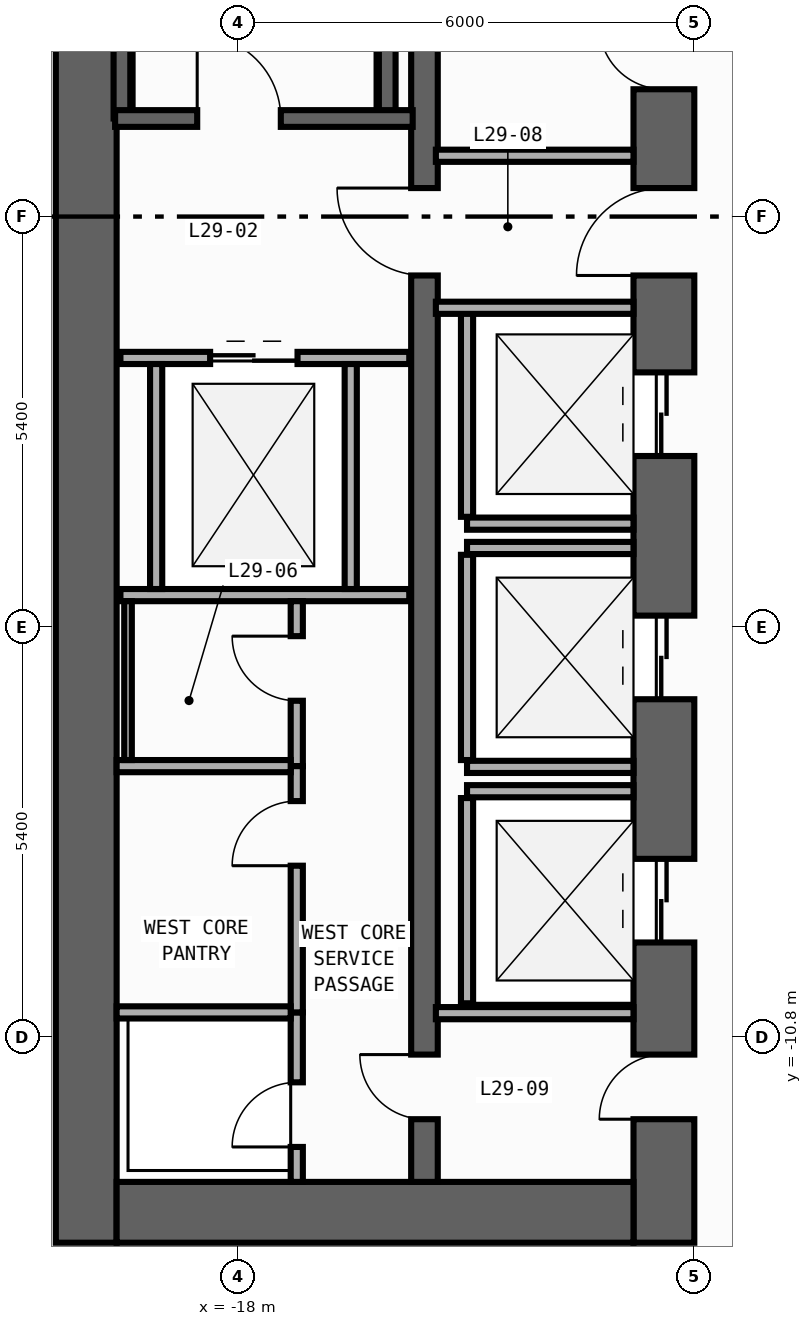
"""IFC4 building model, lengths in metres.
Left out: names, types, materials, properties, quantities, classifications, styles, units other than length and angle.
Written with IfcOpenShell. Run it as: python <this file> out.ifc"""

import sys

from ifc_helpers import new_model, si_unit, direction, frame, frame_2d, origin, place, context, subcontext, project, spatial, rectangle, extrude, element, fill, save


model = new_model("IFC4")
c1 = context("Model", 3, precision=1e-05, world=origin(), true_north=direction((0.0, 1.0)))
c2 = subcontext(c1, "Body", "Model", "MODEL_VIEW")
j1 = project(units=[si_unit("LENGTHUNIT", "METRE"), si_unit("PLANEANGLEUNIT", "RADIAN")], contexts=[c1])
p1 = place(None, origin())
s1 = spatial("IfcSite", under=j1, at=p1, CompositionType="ELEMENT")
p2 = place(p1, origin())
s2 = spatial("IfcBuilding", under=s1, at=p2, CompositionType="ELEMENT")
p3 = place(p2, frame((0.0, 0.0, 126.8)))
s3 = spatial("IfcBuildingStorey", under=s2, at=p3, CompositionType="ELEMENT", Elevation=126.8)
p4 = place(p3, frame((-20.0, -13.5, 0.0), z_axis=(0.0, 0.0, 1.0), x_axis=(0.0, 1.0, 0.0)))
e1 = element("IfcWall", 1, at=p4, inside=s3, PredefinedType="SHEAR", context=c2, shape_type="SweptSolid", body=[
    extrude(rectangle(XDim=27.0, YDim=0.8, at=frame_2d((13.5, 0.0))), origin(), (0.0, 0.0, 1.0), 3.94),
])
p5 = place(p3, frame((-12.4, -13.5, 0.0), z_axis=(0.0, 0.0, 1.0), x_axis=(0.0, 1.0, 0.0)))
e2 = element("IfcWall", 2, at=p5, inside=s3, PredefinedType="SHEAR", context=c2, shape_type="SweptSolid", body=[
    extrude(rectangle(XDim=27.0, YDim=0.8, at=frame_2d((13.5, 0.0))), origin(), (0.0, 0.0, 1.0), 3.94),
])
p6 = place(p5, frame((10.35, 0.0, 0.0)))
e3 = element("IfcOpeningElement", 3, at=p6, cuts=e2, PredefinedType="OPENING", context=c2, shape_type="SweptSolid", body=[
    extrude(rectangle(XDim=1.1, YDim=2.2, at=frame_2d((0.55, 1.1))), frame((0.0, 0.41, 0.0), z_axis=(0.0, -1.0, 0.0), x_axis=(1.0, 0.0, 0.0)), (0.0, 0.0, 1.0), 0.82),
])
p7 = place(p5, frame((7.15, 0.0, 0.0)))
e4 = element("IfcOpeningElement", 4, at=p7, cuts=e2, PredefinedType="OPENING", context=c2, shape_type="SweptSolid", body=[
    extrude(rectangle(XDim=1.1, YDim=2.2, at=frame_2d((0.55, 1.1))), frame((0.0, 0.41, 0.0), z_axis=(0.0, -1.0, 0.0), x_axis=(1.0, 0.0, 0.0)), (0.0, 0.0, 1.0), 0.82),
])
p8 = place(p5, frame((3.95, 0.0, 0.0)))
e5 = element("IfcOpeningElement", 5, at=p8, cuts=e2, PredefinedType="OPENING", context=c2, shape_type="SweptSolid", body=[
    extrude(rectangle(XDim=1.1, YDim=2.2, at=frame_2d((0.55, 1.1))), frame((0.0, 0.41, 0.0), z_axis=(0.0, -1.0, 0.0), x_axis=(1.0, 0.0, 0.0)), (0.0, 0.0, 1.0), 0.82),
])
p9 = place(p5, frame((15.175, 0.0, 0.0)))
e6 = element("IfcOpeningElement", 6, at=p9, cuts=e2, PredefinedType="OPENING", context=c2, shape_type="SweptSolid", body=[
    extrude(rectangle(XDim=0.85, YDim=2.1, at=frame_2d((0.425, 1.05))), frame((0.0, 0.41, 0.0), z_axis=(0.0, -1.0, 0.0), x_axis=(1.0, 0.0, 0.0)), (0.0, 0.0, 1.0), 0.82),
])
p10 = place(p5, frame((21.275, 0.0, 0.0)))
e7 = element("IfcOpeningElement", 7, at=p10, cuts=e2, PredefinedType="OPENING", context=c2, shape_type="SweptSolid", body=[
    extrude(rectangle(XDim=0.85, YDim=2.1, at=frame_2d((0.425, 1.05))), frame((0.0, 0.41, 0.0), z_axis=(0.0, -1.0, 0.0), x_axis=(1.0, 0.0, 0.0)), (0.0, 0.0, 1.0), 0.82),
])
p11 = place(p5, frame((12.725, 0.0, 0.0)))
e8 = element("IfcOpeningElement", 8, at=p11, cuts=e2, PredefinedType="OPENING", context=c2, shape_type="SweptSolid", body=[
    extrude(rectangle(XDim=1.15, YDim=2.2, at=frame_2d((0.575, 1.1))), frame((0.0, 0.41, 0.0), z_axis=(0.0, -1.0, 0.0), x_axis=(1.0, 0.0, 0.0)), (0.0, 0.0, 1.0), 0.82),
])
p12 = place(p5, frame((1.625, 0.0, 0.0)))
e9 = element("IfcOpeningElement", 9, at=p12, cuts=e2, PredefinedType="OPENING", context=c2, shape_type="SweptSolid", body=[
    extrude(rectangle(XDim=0.85, YDim=2.1, at=frame_2d((0.425, 1.05))), frame((0.0, 0.41, 0.0), z_axis=(0.0, -1.0, 0.0), x_axis=(1.0, 0.0, 0.0)), (0.0, 0.0, 1.0), 0.82),
])
p13 = place(p3, frame((-19.6, -13.1, 0.0), z_axis=(0.0, 0.0, 1.0), x_axis=(1.0, 0.0, 0.0)))
e10 = element("IfcWall", 10, at=p13, inside=s3, PredefinedType="SHEAR", context=c2, shape_type="SweptSolid", body=[
    extrude(rectangle(XDim=6.8, YDim=0.8, at=frame_2d((3.4, 0.0))), origin(), (0.0, 0.0, 1.0), 3.94),
])
p14 = place(p3, frame((-15.55, -12.7, 0.0), z_axis=(0.0, 0.0, 1.0), x_axis=(0.0, 1.0, 0.0)))
e11 = element("IfcWall", 11, at=p14, inside=s3, PredefinedType="SHEAR", context=c2, shape_type="SweptSolid", body=[
    extrude(rectangle(XDim=25.4, YDim=0.35, at=frame_2d((12.7, 0.0))), origin(), (0.0, 0.0, 1.0), 3.94),
])
p15 = place(p14, frame((11.925, 0.0, 0.0)))
e12 = element("IfcOpeningElement", 12, at=p15, cuts=e11, PredefinedType="OPENING", context=c2, shape_type="SweptSolid", body=[
    extrude(rectangle(XDim=1.15, YDim=2.2, at=frame_2d((0.575, 1.1))), frame((0.0, 0.185, 0.0), z_axis=(0.0, -1.0, 0.0), x_axis=(1.0, 0.0, 0.0)), (0.0, 0.0, 1.0), 0.37),
])
p16 = place(p14, frame((0.825, 0.0, 0.0)))
e13 = element("IfcOpeningElement", 13, at=p16, cuts=e11, PredefinedType="OPENING", context=c2, shape_type="SweptSolid", body=[
    extrude(rectangle(XDim=0.85, YDim=2.1, at=frame_2d((0.425, 1.05))), frame((0.0, 0.185, 0.0), z_axis=(0.0, -1.0, 0.0), x_axis=(1.0, 0.0, 0.0)), (0.0, 0.0, 1.0), 0.37),
])
for number, where, z_axis, x_axis in (
    (14, (-16.04, 1.29, 0.0), (0.0, 0.0, 1.0), (0.0, 1.0, 0.0)),
    (15, (-19.53, 1.29, 0.0), (0.0, 0.0, 1.0), (0.0, 1.0, 0.0)),
):
    element("IfcWall", number, at=place(p3, frame(where, z_axis=z_axis, x_axis=x_axis)), inside=s3, PredefinedType="SHEAR", context=c2, shape_type="SweptSolid", body=[
        extrude(rectangle(XDim=11.3, YDim=0.22, at=frame_2d((5.65, 0.0))), origin(), (0.0, 0.0, 1.0), 3.94),
    ])
p17 = place(p3, frame((-19.62, 1.29, 0.0), z_axis=(0.0, 0.0, 1.0), x_axis=(1.0, 0.0, 0.0)))
e16 = element("IfcWall", 16, at=p17, inside=s3, PredefinedType="SHEAR", context=c2, shape_type="SweptSolid", body=[
    extrude(rectangle(XDim=3.915, YDim=0.22, at=frame_2d((1.958, 0.0))), origin(), (0.0, 0.0, 1.0), 3.94),
])
p18 = place(p17, frame((1.08, 0.0, 0.0)))
e17 = element("IfcOpeningElement", 17, at=p18, cuts=e16, PredefinedType="OPENING", context=c2, shape_type="SweptSolid", body=[
    extrude(rectangle(XDim=1.1, YDim=2.2, at=frame_2d((0.55, 1.1))), frame((0.0, 0.12, 0.0), z_axis=(0.0, -1.0, 0.0), x_axis=(1.0, 0.0, 0.0)), (0.0, 0.0, 1.0), 0.24),
])
p19 = place(p3, frame((-14.99, -4.04, 0.0), z_axis=(0.0, 0.0, 1.0), x_axis=(1.0, 0.0, 0.0)))
e18 = element("IfcWall", 18, at=p19, inside=s3, PredefinedType="STANDARD", context=c2, shape_type="SweptSolid", body=[
    extrude(rectangle(XDim=2.19, YDim=0.16, at=frame_2d((1.095, 0.0))), origin(), (0.0, 0.0, 1.0), 3.94),
])
p20 = place(p3, frame((-14.99, -3.95, 0.0), z_axis=(0.0, 0.0, 1.0), x_axis=(0.0, 1.0, 0.0)))
e19 = element("IfcWall", 19, at=p20, inside=s3, PredefinedType="STANDARD", context=c2, shape_type="SweptSolid", body=[
    extrude(rectangle(XDim=2.7, YDim=0.16, at=frame_2d((1.35, 0.0))), origin(), (0.0, 0.0, 1.0), 3.94),
])
for number, where, z_axis, x_axis in (
    (20, (-14.99, -7.24, 0.0), (0.0, 0.0, 1.0), (1.0, 0.0, 0.0)),
    (21, (-14.99, -4.36, 0.0), (0.0, 0.0, 1.0), (1.0, 0.0, 0.0)),
):
    element("IfcWall", number, at=place(p3, frame(where, z_axis=z_axis, x_axis=x_axis)), inside=s3, PredefinedType="STANDARD", context=c2, shape_type="SweptSolid", body=[
        extrude(rectangle(XDim=2.19, YDim=0.16, at=frame_2d((1.095, 0.0))), origin(), (0.0, 0.0, 1.0), 3.94),
    ])
p21 = place(p3, frame((-14.99, -7.15, 0.0), z_axis=(0.0, 0.0, 1.0), x_axis=(0.0, 1.0, 0.0)))
e22 = element("IfcWall", 22, at=p21, inside=s3, PredefinedType="STANDARD", context=c2, shape_type="SweptSolid", body=[
    extrude(rectangle(XDim=2.7, YDim=0.16, at=frame_2d((1.35, 0.0))), origin(), (0.0, 0.0, 1.0), 3.94),
])
p22 = place(p3, frame((-14.99, -7.56, 0.0), z_axis=(0.0, 0.0, 1.0), x_axis=(1.0, 0.0, 0.0)))
e23 = element("IfcWall", 23, at=p22, inside=s3, PredefinedType="STANDARD", context=c2, shape_type="SweptSolid", body=[
    extrude(rectangle(XDim=2.19, YDim=0.16, at=frame_2d((1.095, 0.0))), origin(), (0.0, 0.0, 1.0), 3.94),
])
p23 = place(p3, frame((-14.99, -10.35, 0.0), z_axis=(0.0, 0.0, 1.0), x_axis=(0.0, 1.0, 0.0)))
e24 = element("IfcWall", 24, at=p23, inside=s3, PredefinedType="STANDARD", context=c2, shape_type="SweptSolid", body=[
    extrude(rectangle(XDim=2.7, YDim=0.16, at=frame_2d((1.35, 0.0))), origin(), (0.0, 0.0, 1.0), 3.94),
])
p24 = place(p3, frame((-19.55, -1.86, 0.0), z_axis=(0.0, 0.0, 1.0), x_axis=(1.0, 0.0, 0.0)))
e25 = element("IfcWall", 25, at=p24, inside=s3, PredefinedType="STANDARD", context=c2, shape_type="SweptSolid", body=[
    extrude(rectangle(XDim=3.8, YDim=0.16, at=frame_2d((1.9, 0.0))), origin(), (0.0, 0.0, 1.0), 3.94),
])
p25 = place(p24, frame((1.18, 0.0, 0.0)))
e26 = element("IfcOpeningElement", 26, at=p25, cuts=e25, PredefinedType="OPENING", context=c2, shape_type="SweptSolid", body=[
    extrude(rectangle(XDim=1.15, YDim=2.2, at=frame_2d((0.575, 1.1))), frame((0.0, 0.09, 0.0), z_axis=(0.0, -1.0, 0.0), x_axis=(1.0, 0.0, 0.0)), (0.0, 0.0, 1.0), 0.18),
])
p26 = place(p3, frame((-19.55, -4.98, 0.0), z_axis=(0.0, 0.0, 1.0), x_axis=(1.0, 0.0, 0.0)))
e27 = element("IfcWall", 27, at=p26, inside=s3, PredefinedType="STANDARD", context=c2, shape_type="SweptSolid", body=[
    extrude(rectangle(XDim=3.8, YDim=0.16, at=frame_2d((1.9, 0.0))), origin(), (0.0, 0.0, 1.0), 3.94),
])
for number, where, z_axis, x_axis in (
    (28, (-19.08, -4.9, 0.0), (0.0, 0.0, 1.0), (0.0, 1.0, 0.0)),
    (29, (-16.52, -4.9, 0.0), (0.0, 0.0, 1.0), (0.0, 1.0, 0.0)),
):
    element("IfcWall", number, at=place(p3, frame(where, z_axis=z_axis, x_axis=x_axis)), inside=s3, PredefinedType="STANDARD", context=c2, shape_type="SweptSolid", body=[
        extrude(rectangle(XDim=2.96, YDim=0.16, at=frame_2d((1.48, 0.0))), origin(), (0.0, 0.0, 1.0), 3.94),
    ])
for number, where, z_axis, x_axis in (
    (30, (-15.4, 0.8, 0.0), (0.0, 0.0, 1.0), (1.0, 0.0, 0.0)),
    (31, (-15.4, -1.2, 0.0), (0.0, 0.0, 1.0), (1.0, 0.0, 0.0)),
    (32, (-15.4, -10.48, 0.0), (0.0, 0.0, 1.0), (1.0, 0.0, 0.0)),
):
    element("IfcWall", number, at=place(p3, frame(where, z_axis=z_axis, x_axis=x_axis)), inside=s3, PredefinedType="STANDARD", context=c2, shape_type="SweptSolid", body=[
        extrude(rectangle(XDim=2.6, YDim=0.16, at=frame_2d((1.3, 0.0))), origin(), (0.0, 0.0, 1.0), 3.94),
    ])
p27 = place(p3, frame((-17.23, -12.7, 0.0), z_axis=(0.0, 0.0, 1.0), x_axis=(0.0, 1.0, 0.0)))
e33 = element("IfcWall", 33, at=p27, inside=s3, PredefinedType="PARTITIONING", context=c2, shape_type="SweptSolid", body=[
    extrude(rectangle(XDim=2.23, YDim=0.16, at=frame_2d((1.115, 0.0))), origin(), (0.0, 0.0, 1.0), 3.94),
])
p28 = place(p27, frame((0.46, 0.0, 0.0)))
e34 = element("IfcOpeningElement", 34, at=p28, cuts=e33, PredefinedType="OPENING", context=c2, shape_type="SweptSolid", body=[
    extrude(rectangle(XDim=0.85, YDim=2.1, at=frame_2d((0.425, 1.05))), frame((0.0, 0.09, 0.0), z_axis=(0.0, -1.0, 0.0), x_axis=(1.0, 0.0, 0.0)), (0.0, 0.0, 1.0), 0.18),
])
p29 = place(p3, frame((-17.23, -7.23, 0.0), z_axis=(0.0, 0.0, 1.0), x_axis=(0.0, 1.0, 0.0)))
e35 = element("IfcWall", 35, at=p29, inside=s3, PredefinedType="PARTITIONING", context=c2, shape_type="SweptSolid", body=[
    extrude(rectangle(XDim=2.17, YDim=0.16, at=frame_2d((1.085, 0.0))), origin(), (0.0, 0.0, 1.0), 3.94),
])
p30 = place(p29, frame((0.86, 0.0, 0.0)))
e36 = element("IfcOpeningElement", 36, at=p30, cuts=e35, PredefinedType="OPENING", context=c2, shape_type="SweptSolid", body=[
    extrude(rectangle(XDim=0.85, YDim=2.1, at=frame_2d((0.425, 1.05))), frame((0.0, 0.09, 0.0), z_axis=(0.0, -1.0, 0.0), x_axis=(1.0, 0.0, 0.0)), (0.0, 0.0, 1.0), 0.18),
])
p31 = place(p3, frame((-17.23, -10.47, 0.0), z_axis=(0.0, 0.0, 1.0), x_axis=(0.0, 1.0, 0.0)))
e37 = element("IfcWall", 37, at=p31, inside=s3, PredefinedType="PARTITIONING", context=c2, shape_type="SweptSolid", body=[
    extrude(rectangle(XDim=3.24, YDim=0.16, at=frame_2d((1.62, 0.0))), origin(), (0.0, 0.0, 1.0), 3.94),
])
p32 = place(p31, frame((1.93, 0.0, 0.0)))
e38 = element("IfcOpeningElement", 38, at=p32, cuts=e37, PredefinedType="OPENING", context=c2, shape_type="SweptSolid", body=[
    extrude(rectangle(XDim=0.85, YDim=2.1, at=frame_2d((0.425, 1.05))), frame((0.0, 0.09, 0.0), z_axis=(0.0, -1.0, 0.0), x_axis=(1.0, 0.0, 0.0)), (0.0, 0.0, 1.0), 0.18),
])
for number, where, z_axis, x_axis in (
    (39, (-19.6, -10.47, 0.0), (0.0, 0.0, 1.0), (1.0, 0.0, 0.0)),
    (40, (-19.6, -7.23, 0.0), (0.0, 0.0, 1.0), (1.0, 0.0, 0.0)),
):
    element("IfcWall", number, at=place(p3, frame(where, z_axis=z_axis, x_axis=x_axis)), inside=s3, PredefinedType="PARTITIONING", context=c2, shape_type="SweptSolid", body=[
        extrude(rectangle(XDim=2.29, YDim=0.16, at=frame_2d((1.145, 0.0))), origin(), (0.0, 0.0, 1.0), 3.94),
    ])
p33 = place(p3, frame((-19.45, -7.15, 0.0), z_axis=(0.0, 0.0, 1.0), x_axis=(0.0, 1.0, 0.0)))
e41 = element("IfcWall", 41, at=p33, inside=s3, PredefinedType="PARTITIONING", context=c2, shape_type="SweptSolid", body=[
    extrude(rectangle(XDim=2.09, YDim=0.1, at=frame_2d((1.045, 0.0))), origin(), (0.0, 0.0, 1.0), 3.94),
])
p34 = place(p18, origin())
e42 = element("IfcDoor", 42, at=p34, inside=s3, OperationType="SINGLE_SWING_LEFT", PredefinedType="DOOR", context=c2, shape_type="SweptSolid", body=[
    extrude(rectangle(XDim=1.1, YDim=2.2, at=frame_2d((0.55, 1.1))), frame((0.0, 0.025, 0.0), z_axis=(0.0, -1.0, 0.0), x_axis=(1.0, 0.0, 0.0)), (0.0, 0.0, 1.0), 0.05),
])
fill(e17, e42)
p35 = place(p6, origin())
e43 = element("IfcDoor", 43, at=p35, inside=s3, OperationType="DOUBLE_DOOR_SLIDING", PredefinedType="DOOR", context=c2, shape_type="SweptSolid", body=[
    extrude(rectangle(XDim=1.1, YDim=2.2, at=frame_2d((0.55, 1.1))), frame((0.0, 0.025, 0.0), z_axis=(0.0, -1.0, 0.0), x_axis=(1.0, 0.0, 0.0)), (0.0, 0.0, 1.0), 0.05),
])
fill(e3, e43)
p36 = place(p7, origin())
e44 = element("IfcDoor", 44, at=p36, inside=s3, OperationType="DOUBLE_DOOR_SLIDING", PredefinedType="DOOR", context=c2, shape_type="SweptSolid", body=[
    extrude(rectangle(XDim=1.1, YDim=2.2, at=frame_2d((0.55, 1.1))), frame((0.0, 0.025, 0.0), z_axis=(0.0, -1.0, 0.0), x_axis=(1.0, 0.0, 0.0)), (0.0, 0.0, 1.0), 0.05),
])
fill(e4, e44)
p37 = place(p8, origin())
e45 = element("IfcDoor", 45, at=p37, inside=s3, OperationType="DOUBLE_DOOR_SLIDING", PredefinedType="DOOR", context=c2, shape_type="SweptSolid", body=[
    extrude(rectangle(XDim=1.1, YDim=2.2, at=frame_2d((0.55, 1.1))), frame((0.0, 0.025, 0.0), z_axis=(0.0, -1.0, 0.0), x_axis=(1.0, 0.0, 0.0)), (0.0, 0.0, 1.0), 0.05),
])
fill(e5, e45)
p38 = place(p9, origin())
e46 = element("IfcDoor", 46, at=p38, inside=s3, OperationType="SINGLE_SWING_RIGHT", PredefinedType="DOOR", context=c2, shape_type="SweptSolid", body=[
    extrude(rectangle(XDim=0.85, YDim=2.1, at=frame_2d((0.425, 1.05))), frame((0.0, 0.025, 0.0), z_axis=(0.0, -1.0, 0.0), x_axis=(1.0, 0.0, 0.0)), (0.0, 0.0, 1.0), 0.05),
])
fill(e6, e46)
p39 = place(p11, origin())
e47 = element("IfcDoor", 47, at=p39, inside=s3, OperationType="SINGLE_SWING_LEFT", PredefinedType="DOOR", context=c2, shape_type="SweptSolid", body=[
    extrude(rectangle(XDim=1.15, YDim=2.2, at=frame_2d((0.575, 1.1))), frame((0.0, 0.025, 0.0), z_axis=(0.0, -1.0, 0.0), x_axis=(1.0, 0.0, 0.0)), (0.0, 0.0, 1.0), 0.05),
])
fill(e8, e47)
p40 = place(p15, origin())
e48 = element("IfcDoor", 48, at=p40, inside=s3, OperationType="SINGLE_SWING_RIGHT", PredefinedType="DOOR", context=c2, shape_type="SweptSolid", body=[
    extrude(rectangle(XDim=1.15, YDim=2.2, at=frame_2d((0.575, 1.1))), frame((0.0, 0.025, 0.0), z_axis=(0.0, -1.0, 0.0), x_axis=(1.0, 0.0, 0.0)), (0.0, 0.0, 1.0), 0.05),
])
fill(e12, e48)
p41 = place(p12, origin())
e49 = element("IfcDoor", 49, at=p41, inside=s3, OperationType="SINGLE_SWING_LEFT", PredefinedType="DOOR", context=c2, shape_type="SweptSolid", body=[
    extrude(rectangle(XDim=0.85, YDim=2.1, at=frame_2d((0.425, 1.05))), frame((0.0, 0.025, 0.0), z_axis=(0.0, -1.0, 0.0), x_axis=(1.0, 0.0, 0.0)), (0.0, 0.0, 1.0), 0.05),
])
fill(e9, e49)
p42 = place(p16, origin())
e50 = element("IfcDoor", 50, at=p42, inside=s3, OperationType="SINGLE_SWING_RIGHT", PredefinedType="DOOR", context=c2, shape_type="SweptSolid", body=[
    extrude(rectangle(XDim=0.85, YDim=2.1, at=frame_2d((0.425, 1.05))), frame((0.0, 0.025, 0.0), z_axis=(0.0, -1.0, 0.0), x_axis=(1.0, 0.0, 0.0)), (0.0, 0.0, 1.0), 0.05),
])
fill(e13, e50)
p43 = place(p25, origin())
e51 = element("IfcDoor", 51, at=p43, inside=s3, OperationType="DOUBLE_DOOR_SLIDING", PredefinedType="DOOR", context=c2, shape_type="SweptSolid", body=[
    extrude(rectangle(XDim=1.15, YDim=2.2, at=frame_2d((0.575, 1.1))), frame((0.0, 0.025, 0.0), z_axis=(0.0, -1.0, 0.0), x_axis=(1.0, 0.0, 0.0)), (0.0, 0.0, 1.0), 0.05),
])
fill(e26, e51)
p44 = place(p28, origin())
e52 = element("IfcDoor", 52, at=p44, inside=s3, OperationType="SINGLE_SWING_LEFT", PredefinedType="DOOR", context=c2, shape_type="SweptSolid", body=[
    extrude(rectangle(XDim=0.85, YDim=2.1, at=frame_2d((0.425, 1.05))), frame((0.0, 0.025, 0.0), z_axis=(0.0, -1.0, 0.0), x_axis=(1.0, 0.0, 0.0)), (0.0, 0.0, 1.0), 0.05),
])
fill(e34, e52)
p45 = place(p30, origin())
e53 = element("IfcDoor", 53, at=p45, inside=s3, OperationType="SINGLE_SWING_RIGHT", PredefinedType="DOOR", context=c2, shape_type="SweptSolid", body=[
    extrude(rectangle(XDim=0.85, YDim=2.1, at=frame_2d((0.425, 1.05))), frame((0.0, 0.025, 0.0), z_axis=(0.0, -1.0, 0.0), x_axis=(1.0, 0.0, 0.0)), (0.0, 0.0, 1.0), 0.05),
])
fill(e36, e53)
p46 = place(p32, origin())
e54 = element("IfcDoor", 54, at=p46, inside=s3, OperationType="SINGLE_SWING_LEFT", PredefinedType="DOOR", context=c2, shape_type="SweptSolid", body=[
    extrude(rectangle(XDim=0.85, YDim=2.1, at=frame_2d((0.425, 1.05))), frame((0.0, 0.025, 0.0), z_axis=(0.0, -1.0, 0.0), x_axis=(1.0, 0.0, 0.0)), (0.0, 0.0, 1.0), 0.05),
])
fill(e38, e54)
save(model, sys.argv[1])
